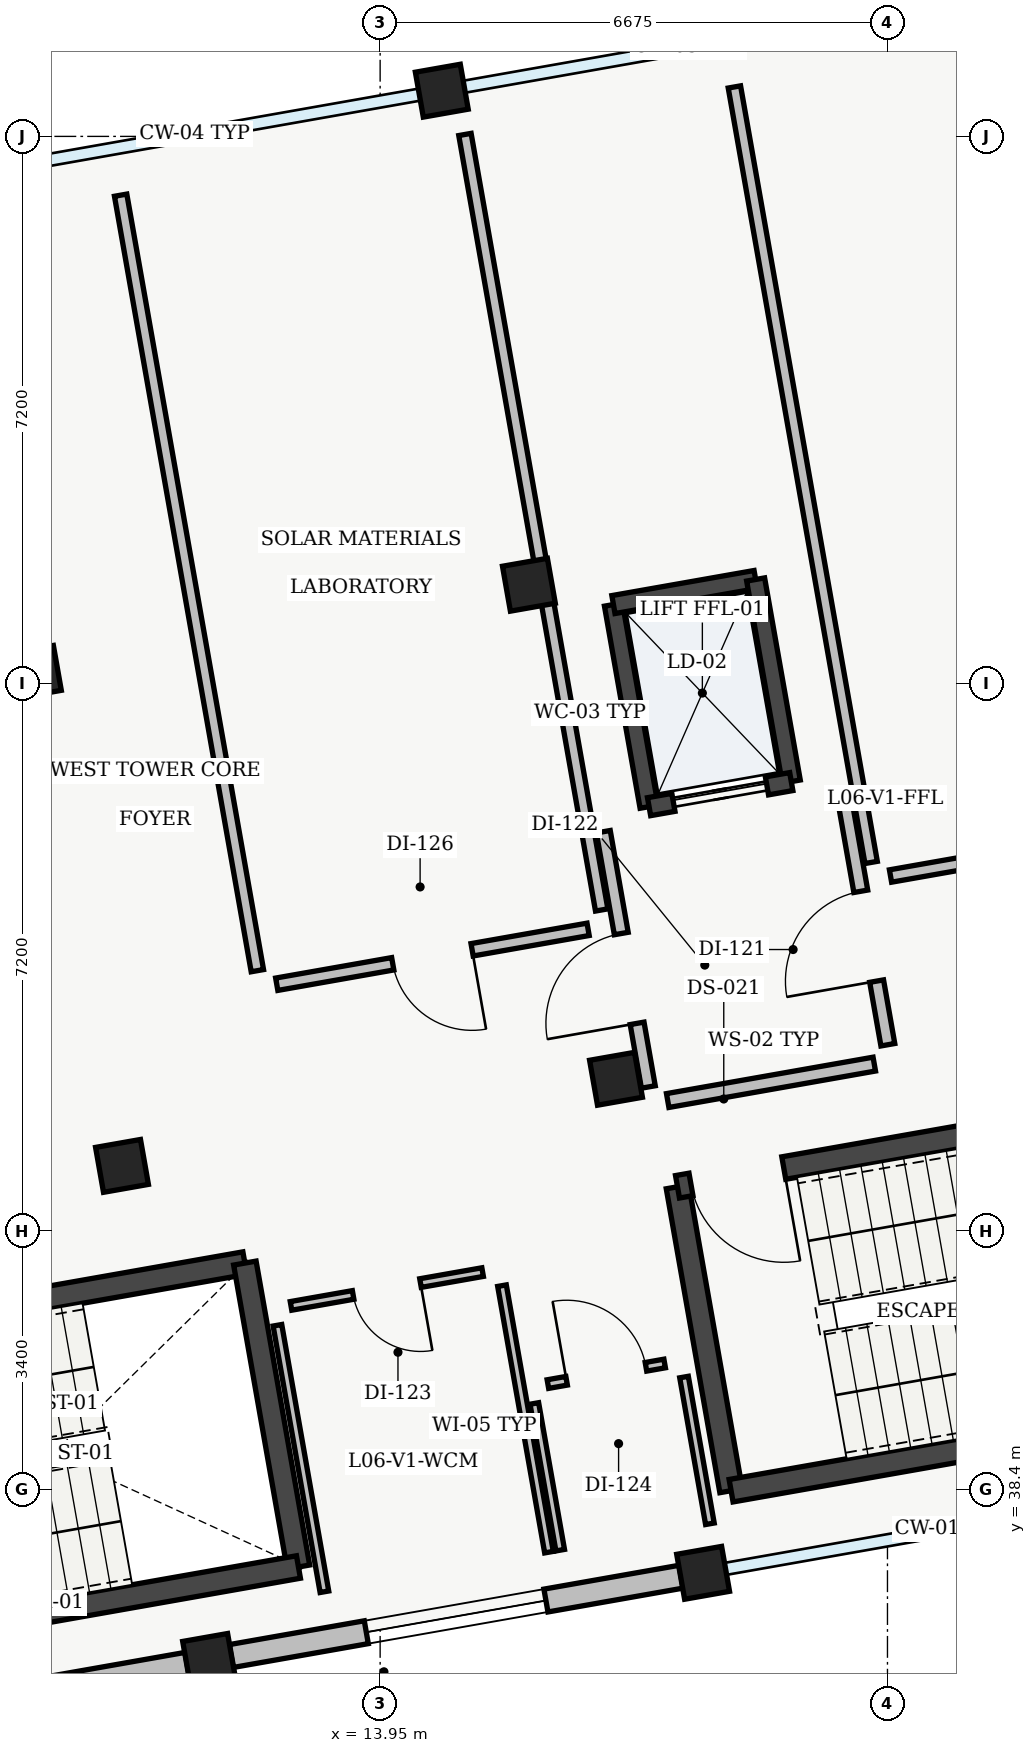
"""IFC4 building model, lengths in metres.
Left out: names, types, materials, properties, quantities, classifications, styles, units other than length and angle.
Written with IfcOpenShell. Run it as: python <this file> out.ifc"""

import sys

from ifc_helpers import new_model, si_unit, direction, frame, frame_2d, origin, origin_2d, place, context, subcontext, project, spatial, rectangle, extrude, element, fill, save


model = new_model("IFC4")
c1 = context("Model", 3, precision=1e-05, world=origin(), true_north=direction((0.0, 1.0)))
c2 = subcontext(c1, "Body", "Model", "MODEL_VIEW")
j1 = project(units=[si_unit("LENGTHUNIT", "METRE"), si_unit("PLANEANGLEUNIT", "RADIAN")], contexts=[c1])
p1 = place(None, origin())
s1 = spatial("IfcSite", under=j1, at=p1, CompositionType="ELEMENT")
p2 = place(p1, origin())
s2 = spatial("IfcBuilding", under=s1, at=p2, CompositionType="ELEMENT")
p3 = place(p2, frame((0.0, 0.0, 27.6)))
s3 = spatial("IfcBuildingStorey", under=s2, at=p3, CompositionType="ELEMENT", Elevation=27.6)
for number, where, z_axis, x_axis in (
    (1, (11.7, 36.156, 0.0), (0.0, 0.0, 1.0), (0.985, 0.174, 0.0)),
    (2, (10.554, 42.656, 0.0), (0.0, 0.0, 1.0), (0.985, 0.174, 0.0)),
    (3, (9.407, 49.156, 0.0), (0.0, 0.0, 1.0), (0.985, 0.174, 0.0)),
    (4, (18.199, 37.302, 0.0), (0.0, 0.0, 1.0), (0.985, 0.174, 0.0)),
    (5, (17.053, 43.802, 0.0), (0.0, 0.0, 1.0), (0.985, 0.174, 0.0)),
    (6, (15.907, 50.302, 0.0), (0.0, 0.0, 1.0), (0.985, 0.174, 0.0)),
    (7, (14.761, 56.801, 0.0), (0.0, 0.0, 1.0), (0.985, 0.174, 0.0)),
):
    element("IfcColumn", number, at=place(p3, frame(where, z_axis=z_axis, x_axis=x_axis)), inside=s3, PredefinedType="COLUMN", context=c2, shape_type="SweptSolid", body=[
        extrude(rectangle(XDim=0.6, YDim=0.6, at=origin_2d()), origin(), (0.0, 0.0, 1.0), 4.32),
    ])
p4 = place(p3, frame((17.909, 37.251, 0.0), z_axis=(0.0, 0.0, 1.0), x_axis=(-0.984805634113, -0.173660194111, 0.0)))
e8 = element("IfcWall", 8, at=p4, inside=s3, PredefinedType="STANDARD", context=c2, shape_type="SweptSolid", body=[
    extrude(rectangle(XDim=6.01, YDim=0.305, at=frame_2d((3.005, 0.0))), origin(), (0.0, 0.0, 1.0), 3.855),
])
p5 = place(p4, frame((1.805, 0.0, 0.95)))
e9 = element("IfcOpeningElement", 9, at=p5, cuts=e8, PredefinedType="OPENING", context=c2, shape_type="SweptSolid", body=[
    extrude(rectangle(XDim=2.4, YDim=1.65, at=frame_2d((1.2, 0.825))), frame((0.0, 0.152, 0.0), z_axis=(0.0, -1.0, 0.0), x_axis=(1.0, 0.0, 0.0)), (0.0, 0.0, 1.0), 0.305),
])
p6 = place(p3, frame((11.409, 36.105, 0.0), z_axis=(0.0, 0.0, 1.0), x_axis=(-0.984812580657, -0.173620796507, 0.0)))
e10 = element("IfcWall", 10, at=p6, inside=s3, PredefinedType="STANDARD", context=c2, shape_type="SweptSolid", body=[
    extrude(rectangle(XDim=6.01, YDim=0.305, at=frame_2d((3.005, 0.0))), origin(), (0.0, 0.0, 1.0), 3.855),
])
p7 = place(p3, frame((4.814, 40.08, 0.0), z_axis=(0.0, 0.0, 1.0), x_axis=(0.984802636214, 0.173677193974, 0.0)))
e11 = element("IfcWall", 11, at=p7, inside=s3, PredefinedType="SHEAR", context=c2, shape_type="SweptSolid", body=[
    extrude(rectangle(XDim=7.47, YDim=0.3, at=frame_2d((3.735, 0.0))), origin(), (0.0, 0.0, 1.0), 4.28),
])
p8 = place(p7, frame((0.18, 0.0, 0.0)))
e12 = element("IfcOpeningElement", 12, at=p8, cuts=e11, PredefinedType="OPENING", context=c2, shape_type="SweptSolid", body=[
    extrude(rectangle(XDim=1.08, YDim=2.15, at=frame_2d((0.54, 1.075))), frame((0.0, 0.15, 0.0), z_axis=(0.0, -1.0, 0.0), x_axis=(1.0, 0.0, 0.0)), (0.0, 0.0, 1.0), 0.3),
])
p9 = place(p3, frame((12.17, 41.377, 0.0), z_axis=(0.0, 0.0, 1.0), x_axis=(0.173654983803, -0.984806552883, 0.0)))
e13 = element("IfcWall", 13, at=p9, inside=s3, PredefinedType="SHEAR", context=c2, shape_type="SweptSolid", body=[
    extrude(rectangle(XDim=4.06, YDim=0.3, at=frame_2d((2.03, 0.0))), origin(), (0.0, 0.0, 1.0), 4.28),
])
p10 = place(p3, frame((12.875, 37.379, 0.0), z_axis=(0.0, 0.0, 1.0), x_axis=(-0.984808225754, -0.173645496596, 0.0)))
e14 = element("IfcWall", 14, at=p10, inside=s3, PredefinedType="SHEAR", context=c2, shape_type="SweptSolid", body=[
    extrude(rectangle(XDim=7.47, YDim=0.3, at=frame_2d((3.735, 0.0))), origin(), (0.0, 0.0, 1.0), 4.28),
])
p11 = place(p3, frame((18.567, 38.383, 0.0), z_axis=(0.0, 0.0, 1.0), x_axis=(-0.173606946886, 0.984815022221, 0.0)))
e15 = element("IfcWall", 15, at=p11, inside=s3, PredefinedType="SHEAR", context=c2, shape_type="SweptSolid", body=[
    extrude(rectangle(XDim=4.06, YDim=0.3, at=frame_2d((2.03, 0.0))), origin(), (0.0, 0.0, 1.0), 4.28),
])
p12 = place(p3, frame((17.863, 42.381, 0.0), z_axis=(0.0, 0.0, 1.0), x_axis=(0.984808225754, 0.173645496596, 0.0)))
e16 = element("IfcWall", 16, at=p12, inside=s3, PredefinedType="SHEAR", context=c2, shape_type="SweptSolid", body=[
    extrude(rectangle(XDim=7.47, YDim=0.3, at=frame_2d((3.735, 0.0))), origin(), (0.0, 0.0, 1.0), 4.28),
])
p13 = place(p12, frame((0.18, 0.0, 0.0)))
e17 = element("IfcOpeningElement", 17, at=p13, cuts=e16, PredefinedType="OPENING", context=c2, shape_type="SweptSolid", body=[
    extrude(rectangle(XDim=1.24, YDim=2.15, at=frame_2d((0.62, 1.075))), frame((0.0, 0.15, 0.0), z_axis=(0.0, -1.0, 0.0), x_axis=(1.0, 0.0, 0.0)), (0.0, 0.0, 1.0), 0.3),
])
p14 = place(p3, frame((25.924, 39.68, 0.0), z_axis=(0.0, 0.0, 1.0), x_axis=(-0.984809211193, -0.173639907711, 0.0)))
e18 = element("IfcWall", 18, at=p14, inside=s3, PredefinedType="SHEAR", context=c2, shape_type="SweptSolid", body=[
    extrude(rectangle(XDim=7.47, YDim=0.3, at=frame_2d((3.735, 0.0))), origin(), (0.0, 0.0, 1.0), 4.28),
])
p15 = place(p3, frame((17.488, 47.382, 0.0), z_axis=(0.0, 0.0, 1.0), x_axis=(-0.173615102578, 0.98481358447, 0.0)))
e19 = element("IfcWall", 19, at=p15, inside=s3, PredefinedType="SHEAR", context=c2, shape_type="SweptSolid", body=[
    extrude(rectangle(XDim=2.7, YDim=0.24, at=frame_2d((1.35, 0.0))), origin(), (0.0, 0.0, 1.0), 4.28),
])
p16 = place(p3, frame((17.02, 50.041, 0.0), z_axis=(0.0, 0.0, 1.0), x_axis=(0.984815882103, 0.173602068988, 0.0)))
e20 = element("IfcWall", 20, at=p16, inside=s3, PredefinedType="SHEAR", context=c2, shape_type="SweptSolid", body=[
    extrude(rectangle(XDim=1.9, YDim=0.24, at=frame_2d((0.95, 0.0))), origin(), (0.0, 0.0, 1.0), 4.28),
])
p17 = place(p3, frame((18.891, 50.371, 0.0), z_axis=(0.0, 0.0, 1.0), x_axis=(0.173615102578, -0.98481358447, 0.0)))
e21 = element("IfcWall", 21, at=p17, inside=s3, PredefinedType="SHEAR", context=c2, shape_type="SweptSolid", body=[
    extrude(rectangle(XDim=2.7, YDim=0.24, at=frame_2d((1.35, 0.0))), origin(), (0.0, 0.0, 1.0), 4.28),
])
p18 = place(p3, frame((19.359, 47.712, 0.0), z_axis=(0.0, 0.0, 1.0), x_axis=(-0.984815882103, -0.173602068988, 0.0)))
e22 = element("IfcWall", 22, at=p18, inside=s3, PredefinedType="SHEAR", context=c2, shape_type="SweptSolid", body=[
    extrude(rectangle(XDim=1.9, YDim=0.24, at=frame_2d((0.95, 0.0))), origin(), (0.0, 0.0, 1.0), 4.28),
])
p19 = place(p18, frame((0.325, 0.0, 0.0)))
e23 = element("IfcOpeningElement", 23, at=p19, cuts=e22, PredefinedType="OPENING", context=c2, shape_type="SweptSolid", body=[
    extrude(rectangle(XDim=1.25, YDim=2.2, at=frame_2d((0.625, 1.1))), frame((0.0, 0.12, 0.0), z_axis=(0.0, -1.0, 0.0), x_axis=(1.0, 0.0, 0.0)), (0.0, 0.0, 1.0), 0.24),
])
p20 = place(p3, frame((17.733, 43.516, 0.0), z_axis=(0.0, 0.0, 1.0), x_axis=(0.984808483292, 0.173644035992, 0.0)))
e24 = element("IfcWall", 24, at=p20, inside=s3, PredefinedType="SOLIDWALL", context=c2, shape_type="SweptSolid", body=[
    extrude(rectangle(XDim=2.76, YDim=0.185, at=frame_2d((1.38, 0.0))), origin(), (0.0, 0.0, 1.0), 3.95),
])
p21 = place(p3, frame((20.63, 44.25, 0.0), z_axis=(0.0, 0.0, 1.0), x_axis=(-0.173621956536, 0.984812376145, 0.0)))
e25 = element("IfcWall", 25, at=p21, inside=s3, PredefinedType="SOLIDWALL", context=c2, shape_type="SweptSolid", body=[
    extrude(rectangle(XDim=3.41, YDim=0.185, at=frame_2d((1.705, 0.0))), origin(), (0.0, 0.0, 1.0), 3.95),
])
p22 = place(p21, frame((0.85, 0.0, 0.0)))
e26 = element("IfcOpeningElement", 26, at=p22, cuts=e25, PredefinedType="OPENING", context=c2, shape_type="SweptSolid", body=[
    extrude(rectangle(XDim=1.2, YDim=2.15, at=frame_2d((0.6, 1.075))), frame((0.0, 0.093, 0.0), z_axis=(0.0, -1.0, 0.0), x_axis=(1.0, 0.0, 0.0)), (0.0, 0.0, 1.0), 0.185),
])
p23 = place(p3, frame((16.886, 47.052, 0.0), z_axis=(0.0, 0.0, 1.0), x_axis=(0.173621956536, -0.984812376145, 0.0)))
e27 = element("IfcWall", 27, at=p23, inside=s3, PredefinedType="SOLIDWALL", context=c2, shape_type="SweptSolid", body=[
    extrude(rectangle(XDim=3.41, YDim=0.185, at=frame_2d((1.705, 0.0))), origin(), (0.0, 0.0, 1.0), 3.95),
])
p24 = place(p23, frame((1.36, 0.0, 0.0)))
e28 = element("IfcOpeningElement", 28, at=p24, cuts=e27, PredefinedType="OPENING", context=c2, shape_type="SweptSolid", body=[
    extrude(rectangle(XDim=1.2, YDim=2.15, at=frame_2d((0.6, 1.075))), frame((0.0, 0.093, 0.0), z_axis=(0.0, -1.0, 0.0), x_axis=(1.0, 0.0, 0.0)), (0.0, 0.0, 1.0), 0.185),
])
p25 = place(p3, frame((16.171, 37.574, 0.0), z_axis=(0.0, 0.0, 1.0), x_axis=(-0.173644490041, 0.984808403233, 0.0)))
e29 = element("IfcWall", 29, at=p25, inside=s3, PredefinedType="PARTITIONING", context=c2, shape_type="SweptSolid", body=[
    extrude(rectangle(XDim=3.56, YDim=0.115, at=frame_2d((1.78, 0.0))), origin(), (0.0, 0.0, 1.0), 3.95),
])
p26 = place(p3, frame((15.298, 41.259, 0.0), z_axis=(0.0, 0.0, 1.0), x_axis=(-0.984803714572, -0.17367107924, 0.0)))
e30 = element("IfcWall", 30, at=p26, inside=s3, PredefinedType="PARTITIONING", context=c2, shape_type="SweptSolid", body=[
    extrude(rectangle(XDim=2.56, YDim=0.115, at=frame_2d((1.28, 0.0))), origin(), (0.0, 0.0, 1.0), 3.95),
])
p27 = place(p26, frame((0.83, 0.0, 0.0)))
e31 = element("IfcOpeningElement", 31, at=p27, cuts=e30, PredefinedType="OPENING", context=c2, shape_type="SweptSolid", body=[
    extrude(rectangle(XDim=0.9, YDim=2.1, at=frame_2d((0.45, 1.05))), frame((0.0, 0.058, 0.0), z_axis=(0.0, -1.0, 0.0), x_axis=(1.0, 0.0, 0.0)), (0.0, 0.0, 1.0), 0.115),
])
p28 = place(p3, frame((12.599, 40.559, 0.0), z_axis=(0.0, 0.0, 1.0), x_axis=(0.173644490041, -0.984808403233, 0.0)))
e32 = element("IfcWall", 32, at=p28, inside=s3, PredefinedType="PARTITIONING", context=c2, shape_type="SweptSolid", body=[
    extrude(rectangle(XDim=3.56, YDim=0.115, at=frame_2d((1.78, 0.0))), origin(), (0.0, 0.0, 1.0), 3.95),
])
p29 = place(p3, frame((18.289, 37.948, 0.0), z_axis=(0.0, 0.0, 1.0), x_axis=(-0.173643211285, 0.984808628706, 0.0)))
e33 = element("IfcWall", 33, at=p29, inside=s3, PredefinedType="PARTITIONING", context=c2, shape_type="SweptSolid", body=[
    extrude(rectangle(XDim=1.96, YDim=0.115, at=frame_2d((0.98, 0.0))), origin(), (0.0, 0.0, 1.0), 3.705),
])
p30 = place(p3, frame((17.694, 40.056, 0.0), z_axis=(0.0, 0.0, 1.0), x_axis=(-0.984797734253, -0.173704987291, 0.0)))
e34 = element("IfcWall", 34, at=p30, inside=s3, PredefinedType="PARTITIONING", context=c2, shape_type="SweptSolid", body=[
    extrude(rectangle(XDim=1.56, YDim=0.115, at=frame_2d((0.78, 0.0))), origin(), (0.0, 0.0, 1.0), 3.95),
])
p31 = place(p30, frame((0.25, 0.0, 0.0)))
e35 = element("IfcOpeningElement", 35, at=p31, cuts=e34, PredefinedType="OPENING", context=c2, shape_type="SweptSolid", body=[
    extrude(rectangle(XDim=1.06, YDim=2.12, at=frame_2d((0.53, 1.06))), frame((0.0, 0.058, 0.0), z_axis=(0.0, -1.0, 0.0), x_axis=(1.0, 0.0, 0.0)), (0.0, 0.0, 1.0), 0.115),
])
p32 = place(p3, frame((15.979, 39.53, 0.0), z_axis=(0.0, 0.0, 1.0), x_axis=(0.173643211285, -0.984808628706, 0.0)))
e36 = element("IfcWall", 36, at=p32, inside=s3, PredefinedType="PARTITIONING", context=c2, shape_type="SweptSolid", body=[
    extrude(rectangle(XDim=1.96, YDim=0.115, at=frame_2d((0.98, 0.0))), origin(), (0.0, 0.0, 1.0), 3.95),
])
p33 = place(p3, frame((12.59, 45.046, 0.0), z_axis=(0.0, 0.0, 1.0), x_axis=(0.984805411783, 0.173661454915, 0.0)))
e37 = element("IfcWall", 37, at=p33, inside=s3, PredefinedType="PARTITIONING", context=c2, shape_type="SweptSolid", body=[
    extrude(rectangle(XDim=4.16, YDim=0.165, at=frame_2d((2.08, 0.0))), origin(), (0.0, 0.0, 1.0), 3.905),
])
p34 = place(p33, frame((1.55, 0.0, 0.0)))
e38 = element("IfcOpeningElement", 38, at=p34, cuts=e37, PredefinedType="OPENING", context=c2, shape_type="SweptSolid", body=[
    extrude(rectangle(XDim=1.06, YDim=2.06, at=frame_2d((0.53, 1.03))), frame((0.0, 0.083, 0.0), z_axis=(0.0, -1.0, 0.0), x_axis=(1.0, 0.0, 0.0)), (0.0, 0.0, 1.0), 0.165),
])
p35 = place(p3, frame((16.865, 46.023, 0.0), z_axis=(0.0, 0.0, 1.0), x_axis=(-0.173632075677, 0.984810592092, 0.0)))
e39 = element("IfcWall", 39, at=p35, inside=s3, PredefinedType="PARTITIONING", context=c2, shape_type="SweptSolid", body=[
    extrude(rectangle(XDim=10.36, YDim=0.165, at=frame_2d((5.18, 0.0))), origin(), (0.0, 0.0, 1.0), 3.705),
])
p36 = place(p3, frame((10.536, 55.427, 0.0), z_axis=(0.0, 0.0, 1.0), x_axis=(0.173654930775, -0.984806562233, 0.0)))
e40 = element("IfcWall", 40, at=p36, inside=s3, PredefinedType="PARTITIONING", context=c2, shape_type="SweptSolid", body=[
    extrude(rectangle(XDim=10.36, YDim=0.165, at=frame_2d((5.18, 0.0))), origin(), (0.0, 0.0, 1.0), 3.95),
])
p37 = place(p3, frame((20.665, 46.469, 0.0), z_axis=(0.0, 0.0, 1.0), x_axis=(0.984804338045, 0.173667543796, 0.0)))
e41 = element("IfcWall", 41, at=p37, inside=s3, PredefinedType="PARTITIONING", context=c2, shape_type="SweptSolid", body=[
    extrude(rectangle(XDim=10.76, YDim=0.165, at=frame_2d((5.38, 0.0))), origin(), (0.0, 0.0, 1.0), 3.905),
])
p38 = place(p37, frame((4.835, 0.0, 0.0)))
e42 = element("IfcOpeningElement", 42, at=p38, cuts=e41, PredefinedType="OPENING", context=c2, shape_type="SweptSolid", body=[
    extrude(rectangle(XDim=1.09, YDim=2.08, at=frame_2d((0.545, 1.04))), frame((0.0, 0.083, 0.0), z_axis=(0.0, -1.0, 0.0), x_axis=(1.0, 0.0, 0.0)), (0.0, 0.0, 1.0), 0.165),
])
p39 = place(p3, frame((18.611, 56.851, 0.0), z_axis=(0.0, 0.0, 1.0), x_axis=(0.173654930775, -0.984806562233, 0.0)))
e43 = element("IfcWall", 43, at=p39, inside=s3, PredefinedType="PARTITIONING", context=c2, shape_type="SweptSolid", body=[
    extrude(rectangle(XDim=10.36, YDim=0.165, at=frame_2d((5.18, 0.0))), origin(), (0.0, 0.0, 1.0), 3.95),
])
p40 = place(p5, origin())
e44 = element("IfcWindow", 44, at=p40, inside=s3, PartitioningType="SINGLE_PANEL", PredefinedType="WINDOW", context=c2, shape_type="SweptSolid", body=[
    extrude(rectangle(XDim=2.4, YDim=1.65, at=frame_2d((1.2, 0.825))), frame((0.0, 0.03, 0.0), z_axis=(0.0, -1.0, 0.0), x_axis=(1.0, 0.0, 0.0)), (0.0, 0.0, 1.0), 0.06),
])
fill(e9, e44)
p41 = place(p13, origin())
e45 = element("IfcDoor", 45, at=p41, inside=s3, OperationType="SINGLE_SWING_RIGHT", PredefinedType="DOOR", context=c2, shape_type="SweptSolid", body=[
    extrude(rectangle(XDim=1.24, YDim=2.15, at=frame_2d((0.62, 1.075))), frame((0.0, 0.025, 0.0), z_axis=(0.0, -1.0, 0.0), x_axis=(1.0, 0.0, 0.0)), (0.0, 0.0, 1.0), 0.05),
])
fill(e17, e45)
p42 = place(p19, origin())
e46 = element("IfcDoor", 46, at=p42, inside=s3, OperationType="SLIDING_TO_RIGHT", PredefinedType="DOOR", context=c2, shape_type="SweptSolid", body=[
    extrude(rectangle(XDim=1.25, YDim=2.2, at=frame_2d((0.625, 1.1))), frame((0.0, 0.025, 0.0), z_axis=(0.0, -1.0, 0.0), x_axis=(1.0, 0.0, 0.0)), (0.0, 0.0, 1.0), 0.05),
])
fill(e23, e46)
p43 = place(p22, origin())
e47 = element("IfcDoor", 47, at=p43, inside=s3, OperationType="SINGLE_SWING_LEFT", PredefinedType="DOOR", context=c2, shape_type="SweptSolid", body=[
    extrude(rectangle(XDim=1.2, YDim=2.15, at=frame_2d((0.6, 1.075))), frame((0.0, 0.025, 0.0), z_axis=(0.0, -1.0, 0.0), x_axis=(1.0, 0.0, 0.0)), (0.0, 0.0, 1.0), 0.05),
])
fill(e26, e47)
p44 = place(p24, origin())
e48 = element("IfcDoor", 48, at=p44, inside=s3, OperationType="SINGLE_SWING_RIGHT", PredefinedType="DOOR", context=c2, shape_type="SweptSolid", body=[
    extrude(rectangle(XDim=1.2, YDim=2.15, at=frame_2d((0.6, 1.075))), frame((0.0, 0.025, 0.0), z_axis=(0.0, -1.0, 0.0), x_axis=(1.0, 0.0, 0.0)), (0.0, 0.0, 1.0), 0.05),
])
fill(e28, e48)
p45 = place(p27, origin())
e49 = element("IfcDoor", 49, at=p45, inside=s3, OperationType="SINGLE_SWING_LEFT", PredefinedType="DOOR", context=c2, shape_type="SweptSolid", body=[
    extrude(rectangle(XDim=0.9, YDim=2.1, at=frame_2d((0.45, 1.05))), frame((0.0, 0.025, 0.0), z_axis=(0.0, -1.0, 0.0), x_axis=(1.0, 0.0, 0.0)), (0.0, 0.0, 1.0), 0.05),
])
fill(e31, e49)
p46 = place(p31, origin())
e50 = element("IfcDoor", 50, at=p46, inside=s3, OperationType="SINGLE_SWING_RIGHT", PredefinedType="DOOR", context=c2, shape_type="SweptSolid", body=[
    extrude(rectangle(XDim=1.06, YDim=2.12, at=frame_2d((0.53, 1.06))), frame((0.0, 0.025, 0.0), z_axis=(0.0, -1.0, 0.0), x_axis=(1.0, 0.0, 0.0)), (0.0, 0.0, 1.0), 0.05),
])
fill(e35, e50)
p47 = place(p34, origin())
e51 = element("IfcDoor", 51, at=p47, inside=s3, OperationType="SINGLE_SWING_RIGHT", PredefinedType="DOOR", context=c2, shape_type="SweptSolid", body=[
    extrude(rectangle(XDim=1.06, YDim=2.06, at=frame_2d((0.53, 1.03))), frame((0.0, 0.025, 0.0), z_axis=(0.0, -1.0, 0.0), x_axis=(1.0, 0.0, 0.0)), (0.0, 0.0, 1.0), 0.05),
])
fill(e38, e51)
save(model, sys.argv[1])
